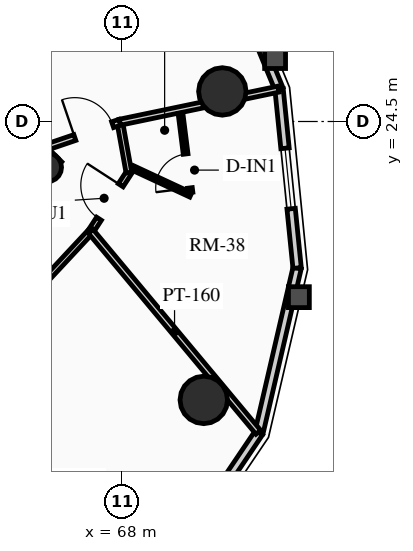
"""IFC4 building model, lengths in metres.
Left out: names, types, materials, properties, quantities, classifications, styles, units other than length and angle.
Written with IfcOpenShell. Run it as: python <this file> out.ifc"""

import sys

from ifc_helpers import new_model, si_unit, direction, frame, frame_2d, origin, origin_2d, place, context, subcontext, project, spatial, rectangle, circle, hollow_circle, extrude, source, transform, mapped, element, fill, save


model = new_model("IFC4")
c1 = context("Model", 3, precision=1e-05, world=origin(), true_north=direction((0.0, 1.0)))
c2 = subcontext(c1, "Body", "Model", "MODEL_VIEW")
j1 = project(units=[si_unit("LENGTHUNIT", "METRE"), si_unit("PLANEANGLEUNIT", "RADIAN")], contexts=[c1])
p1 = place(None, origin())
s1 = spatial("IfcSite", under=j1, at=p1, CompositionType="ELEMENT")
p2 = place(p1, origin())
s2 = spatial("IfcBuilding", under=s1, at=p2, CompositionType="ELEMENT")
p3 = place(p2, frame((0.0, 0.0, 174.88)))
s3 = spatial("IfcBuildingStorey", under=s2, at=p3, CompositionType="ELEMENT", Elevation=174.88)
p4 = place(p3, frame((66.268, 23.298, 0.0), z_axis=(0.0, 0.0, 1.0), x_axis=(-0.707106781187, 0.707106781187, 0.0)))
e1 = element("IfcWall", 1, at=p4, inside=s3, PredefinedType="SHEAR", context=c2, shape_type="SweptSolid", body=[
    extrude(rectangle(XDim=14.1, YDim=0.4, at=frame_2d((7.05, 0.0))), origin(), (0.0, 0.0, 1.0), 2.91),
])
p5 = place(p3, frame((58.561, 15.873, 0.0), z_axis=(0.0, 0.0, 1.0), x_axis=(0.707106781187, 0.707106781187, 0.0)))
e2 = element("IfcWall", 2, at=p5, inside=s3, PredefinedType="SHEAR", context=c2, shape_type="SweptSolid", body=[
    extrude(rectangle(XDim=10.7, YDim=0.4, at=frame_2d((5.35, 0.0))), origin(), (0.0, 0.0, 1.0), 2.91),
])
m1 = source(origin(), c2, "Body", "SweptSolid", [
    extrude(rectangle(XDim=1.5, YDim=2.02, at=frame_2d((0.75, 1.01))), frame((0.0, 0.21, 0.0), z_axis=(0.0, -1.0, 0.0), x_axis=(1.0, 0.0, 0.0)), (0.0, 0.0, 1.0), 0.42),
])
p6 = place(p5, frame((5.45, 0.0, 0.0)))
e3 = element("IfcOpeningElement", 3, at=p6, cuts=e2, PredefinedType="OPENING", context=c2, shape_type="MappedRepresentation", body=[
    mapped(m1, transform((0.0, 0.0, 0.0), x_axis=(1.0, 0.0, 0.0), y_axis=(0.0, 1.0, 0.0), z_axis=(0.0, 0.0, 1.0), scale=1.0)),
])
p7 = place(p3, frame((66.024, 23.294, 0.0), z_axis=(0.0, 0.0, 1.0), x_axis=(0.707106781187, 0.707106781187, 0.0)))
e4 = element("IfcColumn", 4, at=p7, inside=s3, PredefinedType="COLUMN", context=c2, shape_type="SweptSolid", body=[
    extrude(hollow_circle(Radius=0.38, WallThickness=0.032, at=origin_2d()), origin(), (0.0, 0.0, 1.0), 2.91),
])
for number, where, z_axis, x_axis in (
    (5, (70.146, 17.173, 0.0), (0.0, 0.0, 1.0), (1.0, 0.0, 0.0)),
    (6, (70.635, 25.291, 0.0), (0.0, 0.0, 1.0), (1.0, 0.0, 0.0)),
):
    element("IfcColumn", number, at=place(p3, frame(where, z_axis=z_axis, x_axis=x_axis)), inside=s3, PredefinedType="USERDEFINED", context=c2, shape_type="SweptSolid", body=[
        extrude(circle(Radius=0.625, at=origin_2d()), origin(), (0.0, 0.0, 1.0), 2.91),
    ])
p8 = place(p3, frame((71.6, 16.313, 0.0), z_axis=(0.0, 0.0, 1.0), x_axis=(-0.55951912514, -0.828817439852, 0.0)))
e7 = element("IfcWall", 7, at=p8, inside=s3, PredefinedType="SOLIDWALL", context=c2, shape_type="SweptSolid", body=[
    extrude(rectangle(XDim=4.259, YDim=0.22, at=frame_2d((2.129, 0.0))), origin(), (0.0, 0.0, 1.0), 2.245),
])
m2 = source(origin(), c2, "Body", "SweptSolid", [
    extrude(rectangle(XDim=1.6, YDim=1.3, at=frame_2d((0.8, 0.65))), frame((0.0, 0.12, 0.0), z_axis=(0.0, -1.0, 0.0), x_axis=(1.0, 0.0, 0.0)), (0.0, 0.0, 1.0), 0.24),
])
p9 = place(p8, frame((1.33, 0.0, 0.65)))
e8 = element("IfcOpeningElement", 8, at=p9, cuts=e7, PredefinedType="OPENING", context=c2, shape_type="MappedRepresentation", body=[
    mapped(m2, transform((0.0, 0.0, 0.0), x_axis=(1.0, 0.0, 0.0), y_axis=(0.0, 1.0, 0.0), z_axis=(0.0, 0.0, 1.0), scale=1.0)),
])
p10 = place(p3, frame((72.603, 20.645, 0.0), z_axis=(0.0, 0.0, 1.0), x_axis=(-0.22557328587, -0.97422620202, 0.0)))
e9 = element("IfcWall", 9, at=p10, inside=s3, PredefinedType="SOLIDWALL", context=c2, shape_type="SweptSolid", body=[
    extrude(rectangle(XDim=4.446, YDim=0.22, at=frame_2d((2.223, 0.0))), origin(), (0.0, 0.0, 1.0), 2.245),
])
p11 = place(p3, frame((72.127, 25.354, 0.0), z_axis=(0.0, 0.0, 1.0), x_axis=(0.100438356004, -0.994943283129, 0.0)))
e10 = element("IfcWall", 10, at=p11, inside=s3, PredefinedType="SOLIDWALL", context=c2, shape_type="SweptSolid", body=[
    extrude(rectangle(XDim=4.733, YDim=0.22, at=frame_2d((2.366, 0.0))), origin(), (0.0, 0.0, 1.0), 2.245),
])
p12 = place(p11, frame((1.566, 0.0, 0.65)))
e11 = element("IfcOpeningElement", 11, at=p12, cuts=e10, PredefinedType="OPENING", context=c2, shape_type="MappedRepresentation", body=[
    mapped(m2, transform((0.0, 0.0, 0.0), x_axis=(1.0, 0.0, 0.0), y_axis=(0.0, 1.0, 0.0), z_axis=(0.0, 0.0, 1.0), scale=1.0)),
])
p13 = place(p3, frame((70.22, 29.979, 0.0), z_axis=(0.0, 0.0, 1.0), x_axis=(0.381196434348, -0.924494066201, 0.0)))
e12 = element("IfcWall", 12, at=p13, inside=s3, PredefinedType="SOLIDWALL", context=c2, shape_type="SweptSolid", body=[
    extrude(rectangle(XDim=5.003, YDim=0.22, at=frame_2d((2.501, 0.0))), origin(), (0.0, 0.0, 1.0), 2.245),
])
p14 = place(p3, frame((62.756, 16.873, 0.0), z_axis=(0.0, 0.0, 1.0), x_axis=(0.682136885079, 0.73122450042, 0.0)))
e13 = element("IfcWall", 13, at=p14, inside=s3, PredefinedType="PARTITIONING", context=c2, shape_type="SweptSolid", body=[
    extrude(rectangle(XDim=6.476, YDim=0.15, at=frame_2d((3.238, 0.0))), origin(), (0.0, 0.0, 1.0), 2.245),
])
m3 = source(origin(), c2, "Body", "SweptSolid", [
    extrude(rectangle(XDim=1.05, YDim=2.015, at=frame_2d((0.525, 1.007))), frame((0.0, 0.085, 0.0), z_axis=(0.0, -1.0, 0.0), x_axis=(1.0, 0.0, 0.0)), (0.0, 0.0, 1.0), 0.17),
])
p15 = place(p14, frame((2.713, 0.0, 0.0)))
e14 = element("IfcOpeningElement", 14, at=p15, cuts=e13, PredefinedType="OPENING", context=c2, shape_type="MappedRepresentation", body=[
    mapped(m3, transform((0.0, 0.0, 0.0), x_axis=(1.0, 0.0, 0.0), y_axis=(0.0, 1.0, 0.0), z_axis=(0.0, 0.0, 1.0), scale=1.0)),
])
p16 = place(p3, frame((67.173, 21.608, 0.0), z_axis=(0.0, 0.0, 1.0), x_axis=(0.544299403682, 0.838891029367, 0.0)))
e15 = element("IfcWall", 15, at=p16, inside=s3, PredefinedType="PARTITIONING", context=c2, shape_type="SweptSolid", body=[
    extrude(rectangle(XDim=1.844, YDim=0.15, at=frame_2d((0.922, 0.0))), origin(), (0.0, 0.0, 1.0), 2.245),
])
p17 = place(p16, frame((0.397, 0.0, 0.0)))
e16 = element("IfcOpeningElement", 16, at=p17, cuts=e15, PredefinedType="OPENING", context=c2, shape_type="MappedRepresentation", body=[
    mapped(m3, transform((0.0, 0.0, 0.0), x_axis=(1.0, 0.0, 0.0), y_axis=(0.0, 1.0, 0.0), z_axis=(0.0, 0.0, 1.0), scale=1.0)),
])
p18 = place(p3, frame((68.177, 23.155, 0.0), z_axis=(0.0, 0.0, 1.0), x_axis=(-0.1778483434, 0.98405790823, 0.0)))
e17 = element("IfcWall", 17, at=p18, inside=s3, PredefinedType="PARTITIONING", context=c2, shape_type="SweptSolid", body=[
    extrude(rectangle(XDim=1.347, YDim=0.15, at=frame_2d((0.673, 0.0))), origin(), (0.0, 0.0, 1.0), 2.245),
])
p19 = place(p3, frame((67.173, 21.608, 0.0), z_axis=(0.0, 0.0, 1.0), x_axis=(0.64050880156, -0.767950828585, 0.0)))
e18 = element("IfcWall", 18, at=p19, inside=s3, PredefinedType="PARTITIONING", context=c2, shape_type="SweptSolid", body=[
    extrude(rectangle(XDim=6.883, YDim=0.16, at=frame_2d((3.441, 0.0))), origin(), (0.0, 0.0, 1.0), 2.245),
])
p20 = place(p3, frame((67.938, 24.48, 0.0), z_axis=(0.0, 0.0, 1.0), x_axis=(0.978917914143, 0.204254051051, 0.0)))
e19 = element("IfcWall", 19, at=p20, inside=s3, PredefinedType="PARTITIONING", context=c2, shape_type="SweptSolid", body=[
    extrude(rectangle(XDim=4.26, YDim=0.16, at=frame_2d((2.13, 0.0))), origin(), (0.0, 0.0, 1.0), 2.245),
])
p21 = place(p3, frame((66.021, 23.828, 0.0), z_axis=(0.0, 0.0, 1.0), x_axis=(0.946687463515, 0.32215345167, 0.0)))
e20 = element("IfcWall", 20, at=p21, inside=s3, PredefinedType="PARTITIONING", context=c2, shape_type="SweptSolid", body=[
    extrude(rectangle(XDim=2.025, YDim=0.16, at=frame_2d((1.012, 0.0))), origin(), (0.0, 0.0, 1.0), 2.245),
])
m4 = source(origin(), c2, "Body", "SweptSolid", [
    extrude(rectangle(XDim=1.05, YDim=2.015, at=frame_2d((0.525, 1.007))), frame((0.0, 0.09, 0.0), z_axis=(0.0, -1.0, 0.0), x_axis=(1.0, 0.0, 0.0)), (0.0, 0.0, 1.0), 0.18),
])
p22 = place(p21, frame((0.775, 0.0, 0.0)))
e21 = element("IfcOpeningElement", 21, at=p22, cuts=e20, PredefinedType="OPENING", context=c2, shape_type="MappedRepresentation", body=[
    mapped(m4, transform((0.0, 0.0, 0.0), x_axis=(1.0, 0.0, 0.0), y_axis=(0.0, 1.0, 0.0), z_axis=(0.0, 0.0, 1.0), scale=1.0)),
])
p23 = place(p3, frame((68.275, 23.28, 0.0), z_axis=(0.0, 0.0, 1.0), x_axis=(0.906681243062, -0.421816457099, 0.0)))
e22 = element("IfcWall", 22, at=p23, inside=s3, PredefinedType="PARTITIONING", context=c2, shape_type="SweptSolid", body=[
    extrude(rectangle(XDim=1.688, YDim=0.125, at=frame_2d((0.844, 0.0))), origin(), (0.0, 0.0, 1.0), 2.312),
])
p24 = place(p3, frame((69.797, 22.633, 0.0), z_axis=(0.0, 0.0, 1.0), x_axis=(-0.125234581717, 0.992127158958, 0.0)))
e23 = element("IfcWall", 23, at=p24, inside=s3, PredefinedType="PARTITIONING", context=c2, shape_type="SweptSolid", body=[
    extrude(rectangle(XDim=2.104, YDim=0.125, at=frame_2d((1.052, 0.0))), origin(), (0.0, 0.0, 1.0), 2.245),
])
m5 = source(origin(), c2, "Body", "SweptSolid", [
    extrude(rectangle(XDim=0.9, YDim=2.005, at=frame_2d((0.45, 1.002))), frame((0.0, 0.073, 0.0), z_axis=(0.0, -1.0, 0.0), x_axis=(1.0, 0.0, 0.0)), (0.0, 0.0, 1.0), 0.145),
])
p25 = place(p24, frame((0.12, 0.0, 0.0)))
e24 = element("IfcOpeningElement", 24, at=p25, cuts=e23, PredefinedType="OPENING", context=c2, shape_type="MappedRepresentation", body=[
    mapped(m5, transform((0.0, 0.0, 0.0), x_axis=(1.0, 0.0, 0.0), y_axis=(0.0, 1.0, 0.0), z_axis=(0.0, 0.0, 1.0), scale=1.0)),
])
m6 = source(origin(), c2, "Body", "SweptSolid", [
    extrude(rectangle(XDim=1.6, YDim=1.3, at=frame_2d((0.8, 0.65))), frame((0.0, 0.03, 0.0), z_axis=(0.0, -1.0, 0.0), x_axis=(1.0, 0.0, 0.0)), (0.0, 0.0, 1.0), 0.06),
])
p26 = place(p12, origin())
e25 = element("IfcWindow", 25, at=p26, inside=s3, PartitioningType="SINGLE_PANEL", PredefinedType="WINDOW", context=c2, shape_type="MappedRepresentation", body=[
    mapped(m6, transform((0.0, 0.0, 0.0), x_axis=(1.0, 0.0, 0.0), y_axis=(0.0, 1.0, 0.0), z_axis=(0.0, 0.0, 1.0), scale=1.0)),
])
fill(e11, e25)
m7 = source(origin(), c2, "Body", "SweptSolid", [
    extrude(rectangle(XDim=1.05, YDim=2.015, at=frame_2d((0.525, 1.007))), frame((0.0, 0.025, 0.0), z_axis=(0.0, -1.0, 0.0), x_axis=(1.0, 0.0, 0.0)), (0.0, 0.0, 1.0), 0.05),
])
p27 = place(p22, origin())
e26 = element("IfcDoor", 26, at=p27, inside=s3, OperationType="SINGLE_SWING_LEFT", PredefinedType="DOOR", context=c2, shape_type="MappedRepresentation", body=[
    mapped(m7, transform((0.0, 0.0, 0.0), x_axis=(1.0, 0.0, 0.0), y_axis=(0.0, 1.0, 0.0), z_axis=(0.0, 0.0, 1.0), scale=1.0)),
])
fill(e21, e26)
p28 = place(p17, origin())
e27 = element("IfcDoor", 27, at=p28, inside=s3, OperationType="SINGLE_SWING_RIGHT", PredefinedType="DOOR", context=c2, shape_type="MappedRepresentation", body=[
    mapped(m7, transform((0.0, 0.0, 0.0), x_axis=(1.0, 0.0, 0.0), y_axis=(0.0, 1.0, 0.0), z_axis=(0.0, 0.0, 1.0), scale=1.0)),
])
fill(e16, e27)
m8 = source(origin(), c2, "Body", "SweptSolid", [
    extrude(rectangle(XDim=0.9, YDim=2.005, at=frame_2d((0.45, 1.002))), frame((0.0, 0.025, 0.0), z_axis=(0.0, -1.0, 0.0), x_axis=(1.0, 0.0, 0.0)), (0.0, 0.0, 1.0), 0.05),
])
p29 = place(p25, origin())
e28 = element("IfcDoor", 28, at=p29, inside=s3, OperationType="SINGLE_SWING_LEFT", PredefinedType="DOOR", context=c2, shape_type="MappedRepresentation", body=[
    mapped(m8, transform((0.0, 0.0, 0.0), x_axis=(1.0, 0.0, 0.0), y_axis=(0.0, 1.0, 0.0), z_axis=(0.0, 0.0, 1.0), scale=1.0)),
])
fill(e24, e28)
save(model, sys.argv[1])
